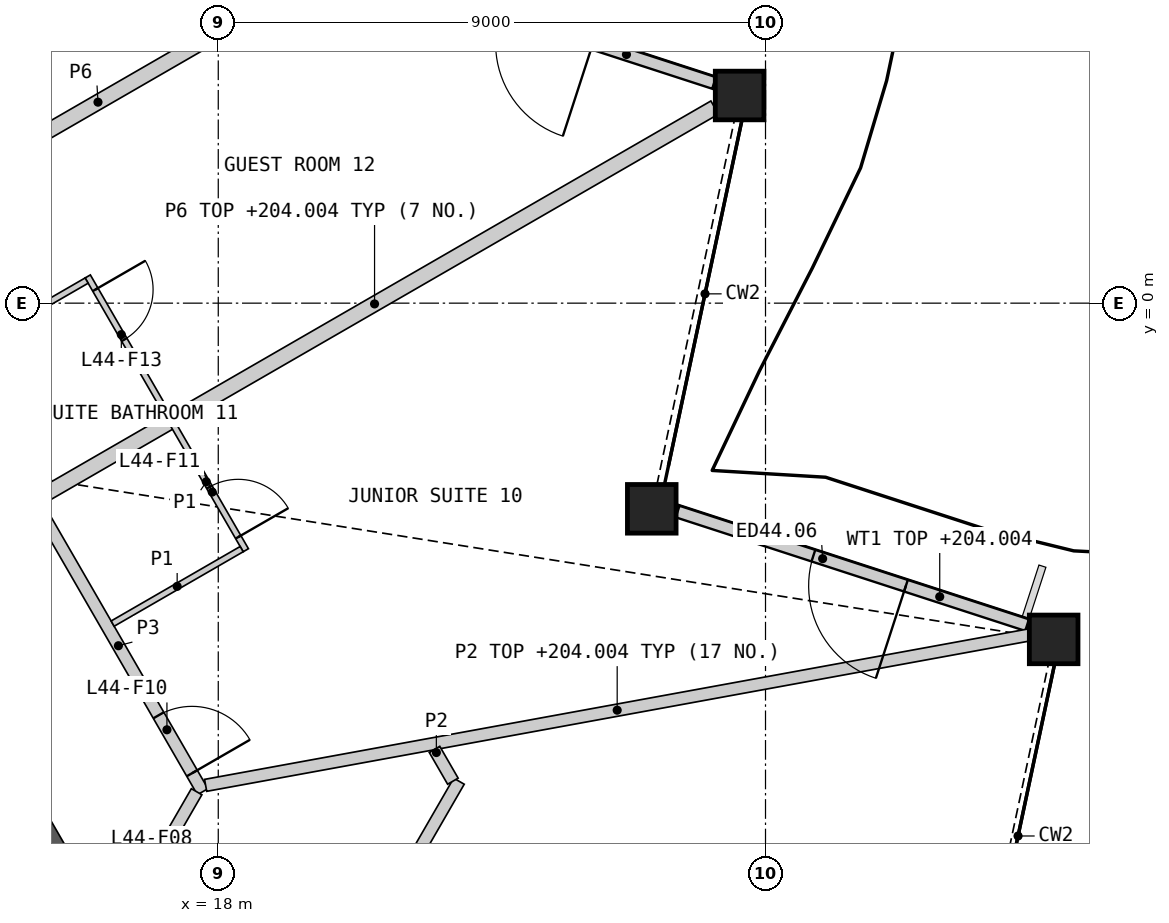
"""IFC4 building model, lengths in metres.
Left out: names, types, materials, properties, quantities, classifications, styles, units other than length and angle.
Written with IfcOpenShell. Run it as: python <this file> out.ifc"""

import sys

from ifc_helpers import new_model, si_unit, direction, frame, frame_2d, origin, origin_2d, place, context, subcontext, project, spatial, polyline, rectangle, hollow_rectangle, outline, extrude, element, fill, save


model = new_model("IFC4")
c1 = context("Model", 3, precision=1e-05, world=origin(), true_north=direction((0.0, 1.0)))
c2 = subcontext(c1, "Body", "Model", "MODEL_VIEW")
j1 = project(units=[si_unit("LENGTHUNIT", "METRE"), si_unit("PLANEANGLEUNIT", "RADIAN")], contexts=[c1])
p1 = place(None, origin())
s1 = spatial("IfcSite", under=j1, at=p1, CompositionType="ELEMENT")
p2 = place(p1, origin())
s2 = spatial("IfcBuilding", under=s1, at=p2, CompositionType="ELEMENT")
p3 = place(p2, frame((0.0, 0.0, 201.6)))
s3 = spatial("IfcBuildingStorey", under=s2, at=p3, CompositionType="ELEMENT", Elevation=201.6)
for number, where, z_axis, x_axis in (
    (1, (31.739, -5.53, 0.0), (0.0, 0.0, 1.0), (1.0, 0.0, 0.0)),
    (2, (25.129, -3.383, 0.0), (0.0, 0.0, 1.0), (1.0, 0.0, 0.0)),
    (3, (26.574, 3.415, 0.0), (0.0, 0.0, 1.0), (1.0, 0.0, 0.0)),
):
    element("IfcColumn", number, at=place(p3, frame(where, z_axis=z_axis, x_axis=x_axis)), inside=s3, PredefinedType="COLUMN", context=c2, shape_type="SweptSolid", body=[
        extrude(hollow_rectangle(XDim=0.8, YDim=0.8, WallThickness=0.05, at=origin_2d()), origin(), (0.0, 0.0, 1.0), 3.6),
    ])
p4 = place(p3, frame((31.302, -5.295, 0.0), z_axis=(0.0, 0.0, 1.0), x_axis=(-0.951059297078, 0.309008435874, 0.0)))
e4 = element("IfcWall", 4, at=p4, inside=s3, PredefinedType="SOLIDWALL", context=c2, shape_type="SweptSolid", body=[
    extrude(rectangle(XDim=6.044, YDim=0.2, at=frame_2d((3.022, 0.0))), origin(), (0.0, 0.0, 1.0), 2.404),
])
p5 = place(p4, frame((2.096, 0.0, 0.0)))
e5 = element("IfcOpeningElement", 5, at=p5, cuts=e4, PredefinedType="OPENING", context=c2, shape_type="SweptSolid", body=[
    extrude(rectangle(XDim=1.6, YDim=2.4, at=frame_2d((0.8, 1.2))), frame((0.0, 0.11, 0.0), z_axis=(0.0, -1.0, 0.0), x_axis=(1.0, 0.0, 0.0)), (0.0, 0.0, 1.0), 0.22),
])
p6 = place(p3, frame((26.154, 3.621, 0.0), z_axis=(0.0, 0.0, 1.0), x_axis=(-0.95104857086, 0.309041446839, 0.0)))
e6 = element("IfcWall", 6, at=p6, inside=s3, PredefinedType="SOLIDWALL", context=c2, shape_type="SweptSolid", body=[
    extrude(rectangle(XDim=6.062, YDim=0.2, at=frame_2d((3.031, 0.0))), origin(), (0.0, 0.0, 1.0), 2.701),
])
p7 = place(p6, frame((2.096, 0.0, 0.0)))
e7 = element("IfcOpeningElement", 7, at=p7, cuts=e6, PredefinedType="OPENING", context=c2, shape_type="SweptSolid", body=[
    extrude(rectangle(XDim=1.6, YDim=2.4, at=frame_2d((0.8, 1.2))), frame((0.0, 0.11, 0.0), z_axis=(0.0, -1.0, 0.0), x_axis=(1.0, 0.0, 0.0)), (0.0, 0.0, 1.0), 0.22),
])
p8 = place(p3, origin())
e8 = element("IfcWall", 8, at=p8, inside=s3, PredefinedType="SHEAR", context=c2, shape_type="SweptSolid", body=[
    extrude(outline(polyline([(14.201, -8.949), (14.201, -8.199), (14.851, -7.824), (15.5, -8.949), (14.201, -8.949)])), origin(), (0.0, 0.0, 1.0), 3.25),
])
p9 = place(p3, frame((14.977, -3.242, 0.0), z_axis=(0.0, 0.0, 1.0), x_axis=(0.866026026416, 0.499998921569, 0.0)))
e9 = element("IfcWall", 9, at=p9, inside=s3, PredefinedType="PARTITIONING", context=c2, shape_type="SweptSolid", body=[
    extrude(rectangle(XDim=12.918, YDim=0.25, at=frame_2d((6.459, 0.0))), origin(), (0.0, 0.0, 1.0), 2.404),
])
p10 = place(p3, frame((12.489, 1.266, 0.0), z_axis=(0.0, 0.0, 1.0), x_axis=(0.866026623601, 0.49999788721, 0.0)))
e10 = element("IfcWall", 10, at=p10, inside=s3, PredefinedType="PARTITIONING", context=c2, shape_type="SweptSolid", body=[
    extrude(rectangle(XDim=8.159, YDim=0.25, at=frame_2d((4.079, 0.0))), origin(), (0.0, 0.0, 1.0), 2.404),
])
p11 = place(p3, frame((14.971, -3.233, 0.0), z_axis=(0.0, 0.0, 1.0), x_axis=(0.500003221507, -0.866023543838, 0.0)))
e11 = element("IfcWall", 11, at=p11, inside=s3, PredefinedType="PARTITIONING", context=c2, shape_type="SweptSolid", body=[
    extrude(rectangle(XDim=5.545, YDim=0.2, at=frame_2d((2.772, 0.0))), origin(), (0.0, 0.0, 1.0), 3.25),
])
p12 = place(p11, frame((4.094, 0.0, 0.0)))
e12 = element("IfcOpeningElement", 12, at=p12, cuts=e11, PredefinedType="OPENING", context=c2, shape_type="SweptSolid", body=[
    extrude(rectangle(XDim=1.1, YDim=2.1, at=frame_2d((0.55, 1.05))), frame((0.0, 0.11, 0.0), z_axis=(0.0, -1.0, 0.0), x_axis=(1.0, 0.0, 0.0)), (0.0, 0.0, 1.0), 0.22),
])
p13 = place(p3, frame((15.731, -11.349, 0.0), z_axis=(0.0, 0.0, 1.0), x_axis=(0.499961815444, 0.866047448526, 0.0)))
e13 = element("IfcWall", 13, at=p13, inside=s3, PredefinedType="PARTITIONING", context=c2, shape_type="SweptSolid", body=[
    extrude(rectangle(XDim=3.826, YDim=0.2, at=frame_2d((1.913, 0.0))), origin(), (0.0, 0.0, 1.0), 3.25),
])
p14 = place(p13, frame((1.49, 0.0, 0.0)))
e14 = element("IfcOpeningElement", 14, at=p14, cuts=e13, PredefinedType="OPENING", context=c2, shape_type="SweptSolid", body=[
    extrude(rectangle(XDim=0.95, YDim=2.1, at=frame_2d((0.475, 1.05))), frame((0.0, 0.11, 0.0), z_axis=(0.0, -1.0, 0.0), x_axis=(1.0, 0.0, 0.0)), (0.0, 0.0, 1.0), 0.22),
])
p15 = place(p3, frame((17.792, -7.931, 0.0), z_axis=(0.0, 0.0, 1.0), x_axis=(0.983720538919, 0.179705039744, 0.0)))
e15 = element("IfcWall", 15, at=p15, inside=s3, PredefinedType="PARTITIONING", context=c2, shape_type="SweptSolid", body=[
    extrude(rectangle(XDim=13.761, YDim=0.2, at=frame_2d((6.88, 0.0))), origin(), (0.0, 0.0, 1.0), 2.404),
])
p16 = place(p3, frame((19.871, -11.479, 0.0), z_axis=(0.0, 0.0, 1.0), x_axis=(0.499987304225, 0.866032733569, 0.0)))
e16 = element("IfcWall", 16, at=p16, inside=s3, PredefinedType="PARTITIONING", context=c2, shape_type="SweptSolid", body=[
    extrude(rectangle(XDim=4.176, YDim=0.2, at=frame_2d((2.088, 0.0))), origin(), (0.0, 0.0, 1.0), 2.404),
])
p17 = place(p3, frame((21.556, -7.339, 0.0), z_axis=(0.0, 0.0, 1.0), x_axis=(0.50022374246, -0.865896187473, 0.0)))
e17 = element("IfcWall", 17, at=p17, inside=s3, PredefinedType="PARTITIONING", context=c2, shape_type="SweptSolid", body=[
    extrude(rectangle(XDim=0.604, YDim=0.2, at=frame_2d((0.302, 0.0))), origin(), (0.0, 0.0, 1.0), 2.404),
])
p18 = place(p3, frame((15.853, 0.439, 0.0), z_axis=(0.0, 0.0, 1.0), x_axis=(0.499971721724, -0.866041729639, 0.0)))
e18 = element("IfcWall", 18, at=p18, inside=s3, PredefinedType="PARTITIONING", context=c2, shape_type="SweptSolid", body=[
    extrude(rectangle(XDim=5.2, YDim=0.1, at=frame_2d((2.6, 0.0))), origin(), (0.0, 0.0, 1.0), 2.404),
])
p19 = place(p18, frame((4.0, 0.0, 0.0)))
e19 = element("IfcOpeningElement", 19, at=p19, cuts=e18, PredefinedType="OPENING", context=c2, shape_type="SweptSolid", body=[
    extrude(rectangle(XDim=0.95, YDim=2.1, at=frame_2d((0.475, 1.05))), frame((0.0, 0.06, 0.0), z_axis=(0.0, -1.0, 0.0), x_axis=(1.0, 0.0, 0.0)), (0.0, 0.0, 1.0), 0.12),
])
p20 = place(p18, frame((0.25, 0.0, 0.0)))
e20 = element("IfcOpeningElement", 20, at=p20, cuts=e18, PredefinedType="OPENING", context=c2, shape_type="SweptSolid", body=[
    extrude(rectangle(XDim=0.95, YDim=2.1, at=frame_2d((0.475, 1.05))), frame((0.0, 0.06, 0.0), z_axis=(0.0, -1.0, 0.0), x_axis=(1.0, 0.0, 0.0)), (0.0, 0.0, 1.0), 0.12),
])
p21 = place(p3, frame((13.713, -0.854, 0.0), z_axis=(0.0, 0.0, 1.0), x_axis=(0.866014668023, 0.500018594424, 0.0)))
e21 = element("IfcWall", 21, at=p21, inside=s3, PredefinedType="PARTITIONING", context=c2, shape_type="SweptSolid", body=[
    extrude(rectangle(XDim=2.45, YDim=0.1, at=frame_2d((1.225, 0.0))), origin(), (0.0, 0.0, 1.0), 2.404),
])
p22 = place(p3, frame((16.263, -5.271, 0.0), z_axis=(0.0, 0.0, 1.0), x_axis=(0.866057815567, 0.499943856944, 0.0)))
e22 = element("IfcWall", 22, at=p22, inside=s3, PredefinedType="PARTITIONING", context=c2, shape_type="SweptSolid", body=[
    extrude(rectangle(XDim=2.45, YDim=0.1, at=frame_2d((1.225, 0.0))), origin(), (0.0, 0.0, 1.0), 2.404),
])
p23 = place(p5, origin())
e23 = element("IfcDoor", 23, at=p23, inside=s3, OperationType="DOUBLE_DOOR_SINGLE_SWING", PredefinedType="DOOR", context=c2, shape_type="SweptSolid", body=[
    extrude(rectangle(XDim=1.6, YDim=2.4, at=frame_2d((0.8, 1.2))), frame((0.0, 0.025, 0.0), z_axis=(0.0, -1.0, 0.0), x_axis=(1.0, 0.0, 0.0)), (0.0, 0.0, 1.0), 0.05),
])
fill(e5, e23)
p24 = place(p12, origin())
e24 = element("IfcDoor", 24, at=p24, inside=s3, OperationType="SINGLE_SWING_RIGHT", PredefinedType="DOOR", context=c2, shape_type="SweptSolid", body=[
    extrude(rectangle(XDim=1.1, YDim=2.1, at=frame_2d((0.55, 1.05))), frame((0.0, 0.025, 0.0), z_axis=(0.0, -1.0, 0.0), x_axis=(1.0, 0.0, 0.0)), (0.0, 0.0, 1.0), 0.05),
])
fill(e12, e24)
p25 = place(p19, origin())
e25 = element("IfcDoor", 25, at=p25, inside=s3, OperationType="SINGLE_SWING_RIGHT", PredefinedType="DOOR", context=c2, shape_type="SweptSolid", body=[
    extrude(rectangle(XDim=0.95, YDim=2.1, at=frame_2d((0.475, 1.05))), frame((0.0, 0.025, 0.0), z_axis=(0.0, -1.0, 0.0), x_axis=(1.0, 0.0, 0.0)), (0.0, 0.0, 1.0), 0.05),
])
fill(e19, e25)
p26 = place(p20, origin())
e26 = element("IfcDoor", 26, at=p26, inside=s3, OperationType="SINGLE_SWING_LEFT", PredefinedType="DOOR", context=c2, shape_type="SweptSolid", body=[
    extrude(rectangle(XDim=0.95, YDim=2.1, at=frame_2d((0.475, 1.05))), frame((0.0, 0.025, 0.0), z_axis=(0.0, -1.0, 0.0), x_axis=(1.0, 0.0, 0.0)), (0.0, 0.0, 1.0), 0.05),
])
fill(e20, e26)
save(model, sys.argv[1])
